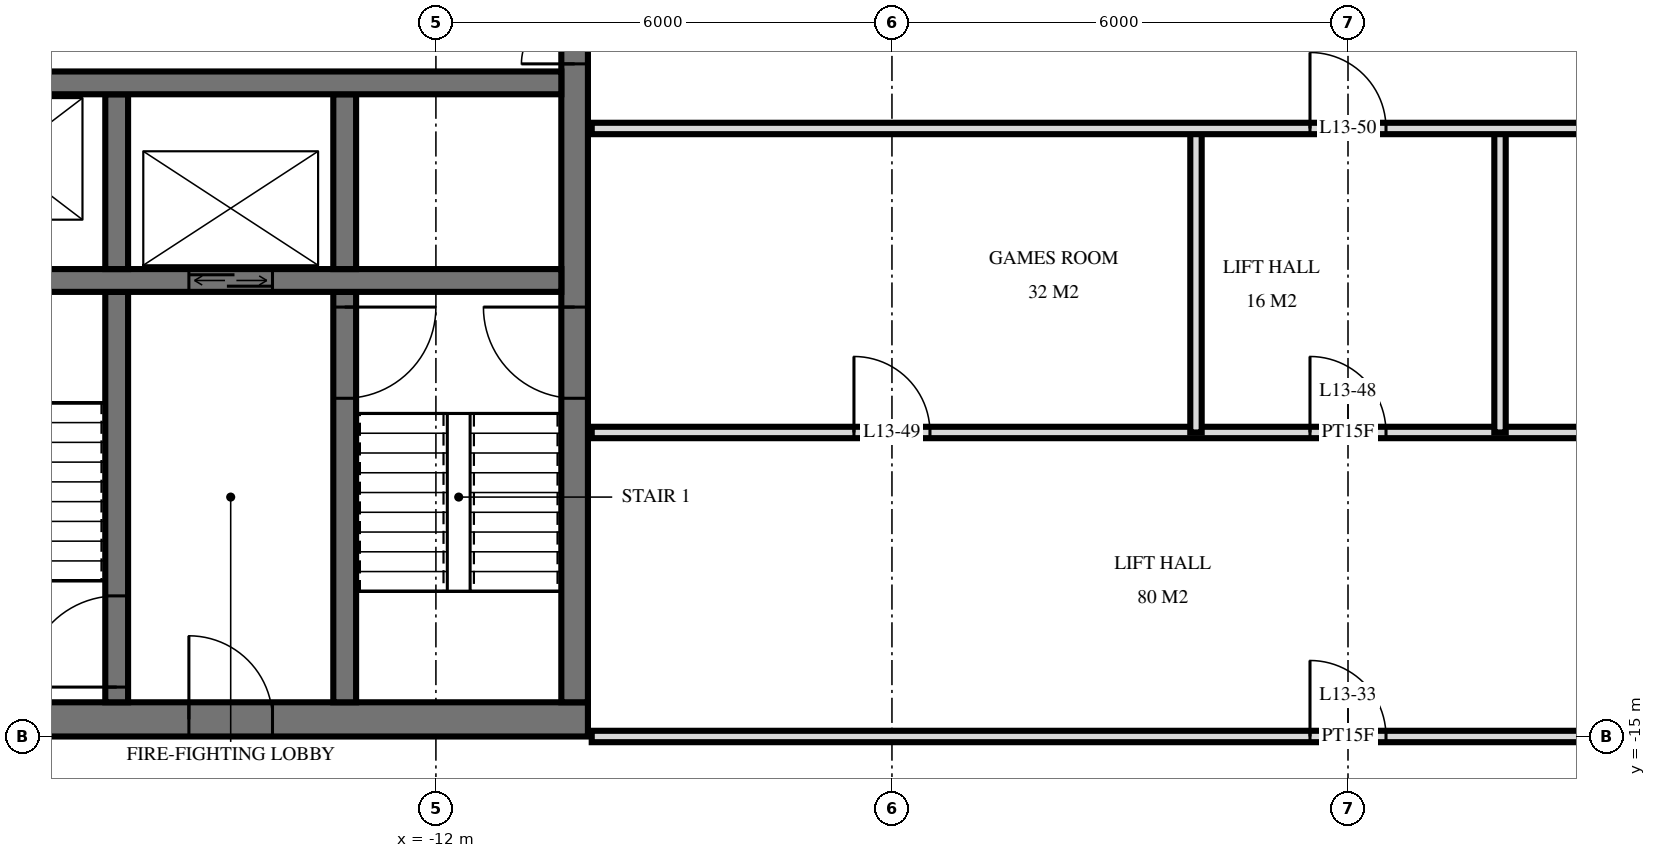
"""IFC4 building model, lengths in metres.
Left out: names, types, materials, properties, quantities, classifications, styles, units other than length and angle.
Written with IfcOpenShell. Run it as: python <this file> out.ifc"""

import sys

from ifc_helpers import new_model, si_unit, direction, frame, frame_2d, origin, place, context, subcontext, project, spatial, rectangle, extrude, element, fill, save


model = new_model("IFC4")
c1 = context("Model", 3, precision=1e-05, world=origin(), true_north=direction((0.0, 1.0)))
c2 = subcontext(c1, "Body", "Model", "MODEL_VIEW")
j1 = project(units=[si_unit("LENGTHUNIT", "METRE"), si_unit("PLANEANGLEUNIT", "RADIAN")], contexts=[c1])
p1 = place(None, origin())
s1 = spatial("IfcSite", under=j1, at=p1, CompositionType="ELEMENT")
p2 = place(p1, origin())
s2 = spatial("IfcBuilding", under=s1, at=p2, CompositionType="ELEMENT")
p3 = place(p2, frame((0.0, 0.0, 56.4)))
s3 = spatial("IfcBuildingStorey", under=s2, at=p3, CompositionType="ELEMENT", Elevation=56.4)
p4 = place(p3, frame((-29.5, -14.775, 0.0), z_axis=(0.0, 0.0, 1.0), x_axis=(1.0, 0.0, 0.0)))
e1 = element("IfcWall", 1, at=p4, inside=s3, PredefinedType="SHEAR", context=c2, shape_type="SweptSolid", body=[
    extrude(rectangle(XDim=19.5, YDim=0.45, at=frame_2d((9.75, 0.0))), origin(), (0.0, 0.0, 1.0), 3.6),
])
p5 = place(p4, frame((11.2, 0.0, 0.0)))
e2 = element("IfcOpeningElement", 2, at=p5, cuts=e1, PredefinedType="OPENING", context=c2, shape_type="SweptSolid", body=[
    extrude(rectangle(XDim=1.2, YDim=2.1, at=frame_2d((0.6, 1.05))), frame((0.0, 0.235, 0.0), z_axis=(0.0, -1.0, 0.0), x_axis=(1.0, 0.0, 0.0)), (0.0, 0.0, 1.0), 0.47),
])
p6 = place(p4, frame((14.25, 0.0, 0.0)))
e3 = element("IfcOpeningElement", 3, at=p6, cuts=e1, PredefinedType="OPENING", context=c2, shape_type="SweptSolid", body=[
    extrude(rectangle(XDim=1.1, YDim=2.1, at=frame_2d((0.55, 1.05))), frame((0.0, 0.235, 0.0), z_axis=(0.0, -1.0, 0.0), x_axis=(1.0, 0.0, 0.0)), (0.0, 0.0, 1.0), 0.47),
])
p7 = place(p4, frame((8.5, 0.0, 0.0)))
e4 = element("IfcOpeningElement", 4, at=p7, cuts=e1, PredefinedType="OPENING", context=c2, shape_type="SweptSolid", body=[
    extrude(rectangle(XDim=0.9, YDim=2.1, at=frame_2d((0.45, 1.05))), frame((0.0, 0.235, 0.0), z_axis=(0.0, -1.0, 0.0), x_axis=(1.0, 0.0, 0.0)), (0.0, 0.0, 1.0), 0.47),
])
p8 = place(p4, frame((6.05, 0.0, 0.0)))
e5 = element("IfcOpeningElement", 5, at=p8, cuts=e1, PredefinedType="OPENING", context=c2, shape_type="SweptSolid", body=[
    extrude(rectangle(XDim=1.0, YDim=2.1, at=frame_2d((0.5, 1.05))), frame((0.0, 0.235, 0.0), z_axis=(0.0, -1.0, 0.0), x_axis=(1.0, 0.0, 0.0)), (0.0, 0.0, 1.0), 0.47),
])
p9 = place(p4, frame((3.413, 0.0, 0.0)))
e6 = element("IfcOpeningElement", 6, at=p9, cuts=e1, PredefinedType="OPENING", context=c2, shape_type="SweptSolid", body=[
    extrude(rectangle(XDim=1.0, YDim=2.1, at=frame_2d((0.5, 1.05))), frame((0.0, 0.235, 0.0), z_axis=(0.0, -1.0, 0.0), x_axis=(1.0, 0.0, 0.0)), (0.0, 0.0, 1.0), 0.47),
])
p10 = place(p4, frame((1.087, 0.0, 0.0)))
e7 = element("IfcOpeningElement", 7, at=p10, cuts=e1, PredefinedType="OPENING", context=c2, shape_type="SweptSolid", body=[
    extrude(rectangle(XDim=1.0, YDim=2.1, at=frame_2d((0.5, 1.05))), frame((0.0, 0.235, 0.0), z_axis=(0.0, -1.0, 0.0), x_axis=(1.0, 0.0, 0.0)), (0.0, 0.0, 1.0), 0.47),
])
p11 = place(p3, frame((-10.175, -14.55, 0.0), z_axis=(0.0, 0.0, 1.0), x_axis=(0.0, 1.0, 0.0)))
e8 = element("IfcWall", 8, at=p11, inside=s3, PredefinedType="SHEAR", context=c2, shape_type="SweptSolid", body=[
    extrude(rectangle(XDim=14.1, YDim=0.35, at=frame_2d((7.05, 0.0))), origin(), (0.0, 0.0, 1.0), 3.6),
])
p12 = place(p11, frame((8.4, 0.0, 0.0)))
e9 = element("IfcOpeningElement", 9, at=p12, cuts=e8, PredefinedType="OPENING", context=c2, shape_type="SweptSolid", body=[
    extrude(rectangle(XDim=1.4, YDim=2.4, at=frame_2d((0.7, 1.2))), frame((0.0, 0.185, 0.0), z_axis=(0.0, -1.0, 0.0), x_axis=(1.0, 0.0, 0.0)), (0.0, 0.0, 1.0), 0.37),
])
p13 = place(p11, frame((10.0, 0.0, 0.0)))
e10 = element("IfcOpeningElement", 10, at=p13, cuts=e8, PredefinedType="OPENING", context=c2, shape_type="SweptSolid", body=[
    extrude(rectangle(XDim=1.4, YDim=2.4, at=frame_2d((0.7, 1.2))), frame((0.0, 0.185, 0.0), z_axis=(0.0, -1.0, 0.0), x_axis=(1.0, 0.0, 0.0)), (0.0, 0.0, 1.0), 0.37),
])
p14 = place(p11, frame((4.0, 0.0, 0.0)))
e11 = element("IfcOpeningElement", 11, at=p14, cuts=e8, PredefinedType="OPENING", context=c2, shape_type="SweptSolid", body=[
    extrude(rectangle(XDim=1.2, YDim=2.1, at=frame_2d((0.6, 1.05))), frame((0.0, 0.185, 0.0), z_axis=(0.0, -1.0, 0.0), x_axis=(1.0, 0.0, 0.0)), (0.0, 0.0, 1.0), 0.37),
])
p15 = place(p3, frame((-29.05, -6.4, 0.0), z_axis=(0.0, 0.0, 1.0), x_axis=(1.0, 0.0, 0.0)))
e12 = element("IfcWall", 12, at=p15, inside=s3, PredefinedType="SHEAR", context=c2, shape_type="SweptSolid", body=[
    extrude(rectangle(XDim=18.7, YDim=0.3, at=frame_2d((9.35, 0.0))), origin(), (0.0, 0.0, 1.0), 3.6),
])
p16 = place(p15, frame((2.95, 0.0, 0.0)))
e13 = element("IfcOpeningElement", 13, at=p16, cuts=e12, PredefinedType="OPENING", context=c2, shape_type="SweptSolid", body=[
    extrude(rectangle(XDim=1.1, YDim=2.1, at=frame_2d((0.55, 1.05))), frame((0.0, 0.16, 0.0), z_axis=(0.0, -1.0, 0.0), x_axis=(1.0, 0.0, 0.0)), (0.0, 0.0, 1.0), 0.32),
])
p17 = place(p15, frame((0.55, 0.0, 0.0)))
e14 = element("IfcOpeningElement", 14, at=p17, cuts=e12, PredefinedType="OPENING", context=c2, shape_type="SweptSolid", body=[
    extrude(rectangle(XDim=1.1, YDim=2.1, at=frame_2d((0.55, 1.05))), frame((0.0, 0.16, 0.0), z_axis=(0.0, -1.0, 0.0), x_axis=(1.0, 0.0, 0.0)), (0.0, 0.0, 1.0), 0.32),
])
p18 = place(p15, frame((10.8, 0.0, 0.0)))
e15 = element("IfcOpeningElement", 15, at=p18, cuts=e12, PredefinedType="OPENING", context=c2, shape_type="SweptSolid", body=[
    extrude(rectangle(XDim=1.1, YDim=2.1, at=frame_2d((0.55, 1.05))), frame((0.0, 0.16, 0.0), z_axis=(0.0, -1.0, 0.0), x_axis=(1.0, 0.0, 0.0)), (0.0, 0.0, 1.0), 0.32),
])
p19 = place(p15, frame((5.6, 0.0, 0.0)))
e16 = element("IfcOpeningElement", 16, at=p19, cuts=e12, PredefinedType="OPENING", context=c2, shape_type="SweptSolid", body=[
    extrude(rectangle(XDim=1.0, YDim=2.1, at=frame_2d((0.5, 1.05))), frame((0.0, 0.16, 0.0), z_axis=(0.0, -1.0, 0.0), x_axis=(1.0, 0.0, 0.0)), (0.0, 0.0, 1.0), 0.32),
])
p20 = place(p3, frame((-29.05, -9.0, 0.0), z_axis=(0.0, 0.0, 1.0), x_axis=(1.0, 0.0, 0.0)))
e17 = element("IfcWall", 17, at=p20, inside=s3, PredefinedType="SHEAR", context=c2, shape_type="SweptSolid", body=[
    extrude(rectangle(XDim=18.7, YDim=0.3, at=frame_2d((9.35, 0.0))), origin(), (0.0, 0.0, 1.0), 3.6),
])
p21 = place(p20, frame((13.8, 0.0, 0.0)))
e18 = element("IfcOpeningElement", 18, at=p21, cuts=e17, PredefinedType="OPENING", context=c2, shape_type="SweptSolid", body=[
    extrude(rectangle(XDim=1.1, YDim=2.1, at=frame_2d((0.55, 1.05))), frame((0.0, 0.16, 0.0), z_axis=(0.0, -1.0, 0.0), x_axis=(1.0, 0.0, 0.0)), (0.0, 0.0, 1.0), 0.32),
])
p22 = place(p3, frame((-13.2, -8.85, 0.0), z_axis=(0.0, 0.0, 1.0), x_axis=(0.0, 1.0, 0.0)))
e19 = element("IfcWall", 19, at=p22, inside=s3, PredefinedType="SHEAR", context=c2, shape_type="SweptSolid", body=[
    extrude(rectangle(XDim=2.3, YDim=0.3, at=frame_2d((1.15, 0.0))), origin(), (0.0, 0.0, 1.0), 3.6),
])
p23 = place(p3, frame((-13.2, -14.55, 0.0), z_axis=(0.0, 0.0, 1.0), x_axis=(0.0, 1.0, 0.0)))
e20 = element("IfcWall", 20, at=p23, inside=s3, PredefinedType="SHEAR", context=c2, shape_type="SweptSolid", body=[
    extrude(rectangle(XDim=5.4, YDim=0.3, at=frame_2d((2.7, 0.0))), origin(), (0.0, 0.0, 1.0), 3.6),
])
p24 = place(p23, frame((4.0, 0.0, 0.0)))
e21 = element("IfcOpeningElement", 21, at=p24, cuts=e20, PredefinedType="OPENING", context=c2, shape_type="SweptSolid", body=[
    extrude(rectangle(XDim=1.2, YDim=2.1, at=frame_2d((0.6, 1.05))), frame((0.0, 0.16, 0.0), z_axis=(0.0, -1.0, 0.0), x_axis=(1.0, 0.0, 0.0)), (0.0, 0.0, 1.0), 0.32),
])
p25 = place(p3, frame((-16.2, -8.85, 0.0), z_axis=(0.0, 0.0, 1.0), x_axis=(0.0, 1.0, 0.0)))
e22 = element("IfcWall", 22, at=p25, inside=s3, PredefinedType="SHEAR", context=c2, shape_type="SweptSolid", body=[
    extrude(rectangle(XDim=2.3, YDim=0.3, at=frame_2d((1.15, 0.0))), origin(), (0.0, 0.0, 1.0), 3.6),
])
p26 = place(p3, frame((-16.2, -14.55, 0.0), z_axis=(0.0, 0.0, 1.0), x_axis=(0.0, 1.0, 0.0)))
e23 = element("IfcWall", 23, at=p26, inside=s3, PredefinedType="SHEAR", context=c2, shape_type="SweptSolid", body=[
    extrude(rectangle(XDim=5.4, YDim=0.3, at=frame_2d((2.7, 0.0))), origin(), (0.0, 0.0, 1.0), 3.6),
])
p27 = place(p26, frame((0.2, 0.0, 0.0)))
e24 = element("IfcOpeningElement", 24, at=p27, cuts=e23, PredefinedType="OPENING", context=c2, shape_type="SweptSolid", body=[
    extrude(rectangle(XDim=1.2, YDim=2.1, at=frame_2d((0.6, 1.05))), frame((0.0, 0.16, 0.0), z_axis=(0.0, -1.0, 0.0), x_axis=(1.0, 0.0, 0.0)), (0.0, 0.0, 1.0), 0.32),
])
for number, where, z_axis, x_axis in (
    (25, (2.0, -11.0, 0.0), (0.0, 0.0, 1.0), (0.0, 1.0, 0.0)),
    (26, (-2.0, -11.0, 0.0), (0.0, 0.0, 1.0), (0.0, 1.0, 0.0)),
):
    element("IfcWall", number, at=place(p3, frame(where, z_axis=z_axis, x_axis=x_axis)), inside=s3, PredefinedType="PARTITIONING", context=c2, shape_type="SweptSolid", body=[
        extrude(rectangle(XDim=4.0, YDim=0.15, at=frame_2d((2.0, 0.0))), origin(), (0.0, 0.0, 1.0), 3.32),
    ])
p28 = place(p3, frame((-9.95, -15.0, 0.0), z_axis=(0.0, 0.0, 1.0), x_axis=(1.0, 0.0, 0.0)))
e27 = element("IfcWall", 27, at=p28, inside=s3, PredefinedType="PARTITIONING", context=c2, shape_type="SweptSolid", body=[
    extrude(rectangle(XDim=19.9, YDim=0.15, at=frame_2d((9.95, 0.0))), origin(), (0.0, 0.0, 1.0), 2.684),
])
p29 = place(p28, frame((9.45, 0.0, 0.0)))
e28 = element("IfcOpeningElement", 28, at=p29, cuts=e27, PredefinedType="OPENING", context=c2, shape_type="SweptSolid", body=[
    extrude(rectangle(XDim=1.0, YDim=2.1, at=frame_2d((0.5, 1.05))), frame((0.0, 0.085, 0.0), z_axis=(0.0, -1.0, 0.0), x_axis=(1.0, 0.0, 0.0)), (0.0, 0.0, 1.0), 0.17),
])
p30 = place(p3, frame((-9.95, -11.0, 0.0), z_axis=(0.0, 0.0, 1.0), x_axis=(1.0, 0.0, 0.0)))
e29 = element("IfcWall", 29, at=p30, inside=s3, PredefinedType="PARTITIONING", context=c2, shape_type="SweptSolid", body=[
    extrude(rectangle(XDim=19.9, YDim=0.15, at=frame_2d((9.95, 0.0))), origin(), (0.0, 0.0, 1.0), 3.32),
])
p31 = place(p30, frame((9.45, 0.0, 0.0)))
e30 = element("IfcOpeningElement", 30, at=p31, cuts=e29, PredefinedType="OPENING", context=c2, shape_type="SweptSolid", body=[
    extrude(rectangle(XDim=1.0, YDim=2.1, at=frame_2d((0.5, 1.05))), frame((0.0, 0.085, 0.0), z_axis=(0.0, -1.0, 0.0), x_axis=(1.0, 0.0, 0.0)), (0.0, 0.0, 1.0), 0.17),
])
p32 = place(p30, frame((3.45, 0.0, 0.0)))
e31 = element("IfcOpeningElement", 31, at=p32, cuts=e29, PredefinedType="OPENING", context=c2, shape_type="SweptSolid", body=[
    extrude(rectangle(XDim=1.0, YDim=2.1, at=frame_2d((0.5, 1.05))), frame((0.0, 0.085, 0.0), z_axis=(0.0, -1.0, 0.0), x_axis=(1.0, 0.0, 0.0)), (0.0, 0.0, 1.0), 0.17),
])
p33 = place(p3, frame((-9.95, -7.0, 0.0), z_axis=(0.0, 0.0, 1.0), x_axis=(1.0, 0.0, 0.0)))
e32 = element("IfcWall", 32, at=p33, inside=s3, PredefinedType="PARTITIONING", context=c2, shape_type="SweptSolid", body=[
    extrude(rectangle(XDim=19.9, YDim=0.15, at=frame_2d((9.95, 0.0))), origin(), (0.0, 0.0, 1.0), 3.32),
])
p34 = place(p33, frame((9.45, 0.0, 0.0)))
e33 = element("IfcOpeningElement", 33, at=p34, cuts=e32, PredefinedType="OPENING", context=c2, shape_type="SweptSolid", body=[
    extrude(rectangle(XDim=1.0, YDim=2.1, at=frame_2d((0.5, 1.05))), frame((0.0, 0.085, 0.0), z_axis=(0.0, -1.0, 0.0), x_axis=(1.0, 0.0, 0.0)), (0.0, 0.0, 1.0), 0.17),
])
p35 = place(p33, frame((15.45, 0.0, 0.0)))
e34 = element("IfcOpeningElement", 34, at=p35, cuts=e32, PredefinedType="OPENING", context=c2, shape_type="SweptSolid", body=[
    extrude(rectangle(XDim=1.0, YDim=2.1, at=frame_2d((0.5, 1.05))), frame((0.0, 0.085, 0.0), z_axis=(0.0, -1.0, 0.0), x_axis=(1.0, 0.0, 0.0)), (0.0, 0.0, 1.0), 0.17),
])
p36 = place(p21, origin())
e35 = element("IfcDoor", 35, at=p36, inside=s3, OperationType="DOUBLE_DOOR_SLIDING", PredefinedType="USERDEFINED", context=c2, shape_type="SweptSolid", body=[
    extrude(rectangle(XDim=1.1, YDim=2.1, at=frame_2d((0.55, 1.05))), frame((0.0, 0.025, 0.0), z_axis=(0.0, -1.0, 0.0), x_axis=(1.0, 0.0, 0.0)), (0.0, 0.0, 1.0), 0.05),
])
fill(e18, e35)
p37 = place(p12, origin())
e36 = element("IfcDoor", 36, at=p37, inside=s3, OperationType="DOUBLE_DOOR_SINGLE_SWING", PredefinedType="DOOR", context=c2, shape_type="SweptSolid", body=[
    extrude(rectangle(XDim=1.4, YDim=2.4, at=frame_2d((0.7, 1.2))), frame((0.0, 0.025, 0.0), z_axis=(0.0, -1.0, 0.0), x_axis=(1.0, 0.0, 0.0)), (0.0, 0.0, 1.0), 0.05),
])
fill(e9, e36)
p38 = place(p14, origin())
e37 = element("IfcDoor", 37, at=p38, inside=s3, OperationType="SINGLE_SWING_LEFT", PredefinedType="DOOR", context=c2, shape_type="SweptSolid", body=[
    extrude(rectangle(XDim=1.2, YDim=2.1, at=frame_2d((0.6, 1.05))), frame((0.0, 0.025, 0.0), z_axis=(0.0, -1.0, 0.0), x_axis=(1.0, 0.0, 0.0)), (0.0, 0.0, 1.0), 0.05),
])
fill(e11, e37)
p39 = place(p6, origin())
e38 = element("IfcDoor", 38, at=p39, inside=s3, OperationType="SINGLE_SWING_RIGHT", PredefinedType="DOOR", context=c2, shape_type="SweptSolid", body=[
    extrude(rectangle(XDim=1.1, YDim=2.1, at=frame_2d((0.55, 1.05))), frame((0.0, 0.025, 0.0), z_axis=(0.0, -1.0, 0.0), x_axis=(1.0, 0.0, 0.0)), (0.0, 0.0, 1.0), 0.05),
])
fill(e3, e38)
p40 = place(p24, frame((0.6, 0.0, 0.0), z_axis=(0.0, 0.0, 1.0), x_axis=(-1.0, 0.0, 0.0)))
e39 = element("IfcDoor", 39, at=p40, inside=s3, OperationType="SINGLE_SWING_RIGHT", PredefinedType="DOOR", context=c2, shape_type="SweptSolid", body=[
    extrude(rectangle(XDim=1.2, YDim=2.1, at=frame_2d((0.0, 1.05))), frame((0.0, -0.025, 0.0), z_axis=(0.0, 1.0, 0.0), x_axis=(-1.0, 0.0, 0.0)), (0.0, 0.0, 1.0), 0.05),
])
fill(e21, e39)
p41 = place(p27, origin())
e40 = element("IfcDoor", 40, at=p41, inside=s3, OperationType="SINGLE_SWING_RIGHT", PredefinedType="DOOR", context=c2, shape_type="SweptSolid", body=[
    extrude(rectangle(XDim=1.2, YDim=2.1, at=frame_2d((0.6, 1.05))), frame((0.0, 0.025, 0.0), z_axis=(0.0, -1.0, 0.0), x_axis=(1.0, 0.0, 0.0)), (0.0, 0.0, 1.0), 0.05),
])
fill(e24, e40)
p42 = place(p29, origin())
e41 = element("IfcDoor", 41, at=p42, inside=s3, OperationType="SINGLE_SWING_RIGHT", PredefinedType="DOOR", context=c2, shape_type="SweptSolid", body=[
    extrude(rectangle(XDim=1.0, YDim=2.1, at=frame_2d((0.5, 1.05))), frame((0.0, 0.025, 0.0), z_axis=(0.0, -1.0, 0.0), x_axis=(1.0, 0.0, 0.0)), (0.0, 0.0, 1.0), 0.05),
])
fill(e28, e41)
p43 = place(p31, origin())
e42 = element("IfcDoor", 42, at=p43, inside=s3, OperationType="SINGLE_SWING_RIGHT", PredefinedType="DOOR", context=c2, shape_type="SweptSolid", body=[
    extrude(rectangle(XDim=1.0, YDim=2.1, at=frame_2d((0.5, 1.05))), frame((0.0, 0.025, 0.0), z_axis=(0.0, -1.0, 0.0), x_axis=(1.0, 0.0, 0.0)), (0.0, 0.0, 1.0), 0.05),
])
fill(e30, e42)
p44 = place(p32, origin())
e43 = element("IfcDoor", 43, at=p44, inside=s3, OperationType="SINGLE_SWING_RIGHT", PredefinedType="DOOR", context=c2, shape_type="SweptSolid", body=[
    extrude(rectangle(XDim=1.0, YDim=2.1, at=frame_2d((0.5, 1.05))), frame((0.0, 0.025, 0.0), z_axis=(0.0, -1.0, 0.0), x_axis=(1.0, 0.0, 0.0)), (0.0, 0.0, 1.0), 0.05),
])
fill(e31, e43)
p45 = place(p34, origin())
e44 = element("IfcDoor", 44, at=p45, inside=s3, OperationType="SINGLE_SWING_RIGHT", PredefinedType="DOOR", context=c2, shape_type="SweptSolid", body=[
    extrude(rectangle(XDim=1.0, YDim=2.1, at=frame_2d((0.5, 1.05))), frame((0.0, 0.025, 0.0), z_axis=(0.0, -1.0, 0.0), x_axis=(1.0, 0.0, 0.0)), (0.0, 0.0, 1.0), 0.05),
])
fill(e33, e44)
save(model, sys.argv[1])
